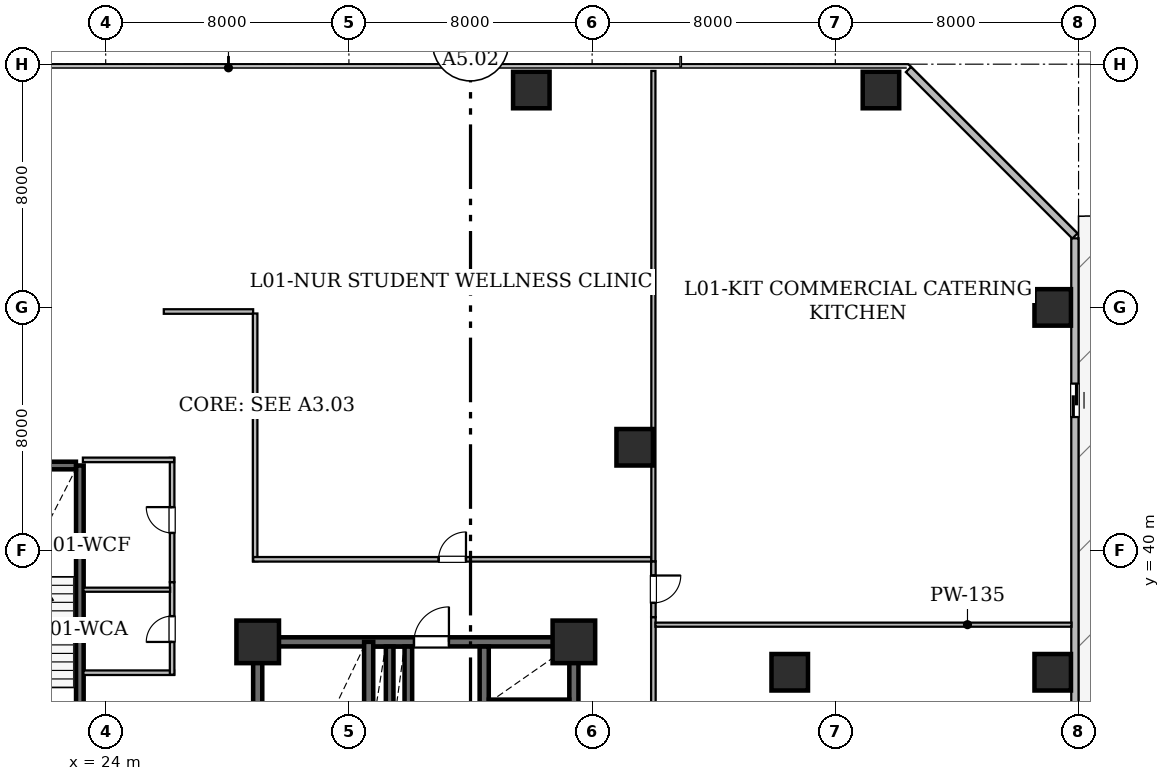
"""IFC4 building model, lengths in metres.
Left out: names, types, materials, properties, quantities, classifications, styles, units other than length and angle.
Written with IfcOpenShell. Run it as: python <this file> out.ifc"""

import sys

from ifc_helpers import new_model, si_unit, direction, frame, frame_2d, origin, origin_2d, place, context, subcontext, project, spatial, rectangle, hollow_rectangle, extrude, element, fill, save


model = new_model("IFC4")
c1 = context("Model", 3, precision=1e-05, world=origin(), true_north=direction((0.0, 1.0)))
c2 = subcontext(c1, "Body", "Model", "MODEL_VIEW")
j1 = project(units=[si_unit("LENGTHUNIT", "METRE"), si_unit("PLANEANGLEUNIT", "RADIAN")], contexts=[c1])
p1 = place(None, origin())
s1 = spatial("IfcSite", under=j1, at=p1, CompositionType="ELEMENT")
p2 = place(p1, origin())
s2 = spatial("IfcBuilding", under=s1, at=p2, CompositionType="ELEMENT")
p3 = place(p2, frame((0.0, 0.0, 7.2)))
s3 = spatial("IfcBuildingStorey", under=s2, at=p3, CompositionType="ELEMENT", Elevation=7.2)
for number, where, z_axis, x_axis in (
    (1, (29.0, 37.0, 0.0), (0.0, 0.0, 1.0), (1.0, 0.0, 0.0)),
    (2, (39.4, 37.0, 0.0), (0.0, 0.0, 1.0), (1.0, 0.0, 0.0)),
):
    element("IfcColumn", number, at=place(p3, frame(where, z_axis=z_axis, x_axis=x_axis)), inside=s3, PredefinedType="COLUMN", context=c2, shape_type="SweptSolid", body=[
        extrude(hollow_rectangle(XDim=1.4, YDim=1.4, WallThickness=0.07, at=origin_2d()), origin(), (0.0, 0.0, 1.0), 4.8),
    ])
for number, where, z_axis, x_axis in (
    (3, (38.0, 55.15, 0.0), (0.0, 0.0, 1.0), (1.0, 0.0, 0.0)),
    (4, (49.5, 55.15, 0.0), (0.0, 0.0, 1.0), (1.0, 0.0, 0.0)),
    (5, (55.15, 36.0, 0.0), (0.0, 0.0, 1.0), (1.0, 0.0, 0.0)),
    (6, (55.15, 48.0, 0.0), (0.0, 0.0, 1.0), (1.0, 0.0, 0.0)),
    (7, (41.4, 43.4, 0.0), (0.0, 0.0, 1.0), (1.0, 0.0, 0.0)),
    (8, (46.5, 36.0, 0.0), (0.0, 0.0, 1.0), (1.0, 0.0, 0.0)),
):
    element("IfcColumn", number, at=place(p3, frame(where, z_axis=z_axis, x_axis=x_axis)), inside=s3, PredefinedType="COLUMN", context=c2, shape_type="SweptSolid", body=[
        extrude(hollow_rectangle(XDim=1.2, YDim=1.2, WallThickness=0.06, at=origin_2d()), origin(), (0.0, 0.0, 1.0), 4.8),
    ])
p4 = place(p3, frame((50.405, 55.825, 0.0), z_axis=(0.0, 0.0, 1.0), x_axis=(0.707106781187, -0.707106781187, 0.0)))
e9 = element("IfcWall", 9, at=p4, inside=s3, PredefinedType="STANDARD", context=c2, shape_type="SweptSolid", body=[
    extrude(rectangle(XDim=7.743, YDim=0.24, at=frame_2d((3.871, 0.0))), origin(), (0.0, 0.0, 1.0), 4.48),
])
p5 = place(p3, frame((55.88, 50.272, 0.0), z_axis=(0.0, 0.0, 1.0), x_axis=(0.0, -1.0, 0.0)))
e10 = element("IfcWall", 10, at=p5, inside=s3, PredefinedType="STANDARD", context=c2, shape_type="SweptSolid", body=[
    extrude(rectangle(XDim=19.032, YDim=0.24, at=frame_2d((9.516, 0.0))), origin(), (0.0, 0.0, 1.0), 4.48),
])
p6 = place(p5, frame((4.778, 0.0, 0.0)))
e11 = element("IfcOpeningElement", 11, at=p6, cuts=e10, PredefinedType="OPENING", context=c2, shape_type="SweptSolid", body=[
    extrude(rectangle(XDim=1.1, YDim=2.2, at=frame_2d((0.55, 1.1))), frame((0.0, 0.13, 0.0), z_axis=(0.0, -1.0, 0.0), x_axis=(1.0, 0.0, 0.0)), (0.0, 0.0, 1.0), 0.26),
])
p7 = place(p3, frame((29.0, 28.0, 0.0), z_axis=(0.0, 0.0, 1.0), x_axis=(0.0, 1.0, 0.0)))
e12 = element("IfcWall", 12, at=p7, inside=s3, PredefinedType="SHEAR", context=c2, shape_type="SweptSolid", body=[
    extrude(rectangle(XDim=9.0, YDim=0.3, at=frame_2d((4.5, 0.0))), origin(), (0.0, 0.0, 1.0), 4.48),
])
p8 = place(p3, frame((29.0, 37.0, 0.0), z_axis=(0.0, 0.0, 1.0), x_axis=(1.0, 0.0, 0.0)))
e13 = element("IfcWall", 13, at=p8, inside=s3, PredefinedType="SHEAR", context=c2, shape_type="SweptSolid", body=[
    extrude(rectangle(XDim=10.4, YDim=0.3, at=frame_2d((5.2, 0.0))), origin(), (0.0, 0.0, 1.0), 4.48),
])
p9 = place(p8, frame((5.14, 0.0, 0.0)))
e14 = element("IfcOpeningElement", 14, at=p9, cuts=e13, PredefinedType="OPENING", context=c2, shape_type="SweptSolid", body=[
    extrude(rectangle(XDim=1.15, YDim=2.2, at=frame_2d((0.575, 1.1))), frame((0.0, 0.16, 0.0), z_axis=(0.0, -1.0, 0.0), x_axis=(1.0, 0.0, 0.0)), (0.0, 0.0, 1.0), 0.32),
])
p10 = place(p3, frame((39.4, 24.4, 0.0), z_axis=(0.0, 0.0, 1.0), x_axis=(0.0, 1.0, 0.0)))
e15 = element("IfcWall", 15, at=p10, inside=s3, PredefinedType="SHEAR", context=c2, shape_type="SweptSolid", body=[
    extrude(rectangle(XDim=12.6, YDim=0.3, at=frame_2d((6.3, 0.0))), origin(), (0.0, 0.0, 1.0), 4.48),
])
p11 = place(p3, frame((32.65, 28.0, 0.0), z_axis=(0.0, 0.0, 1.0), x_axis=(0.0, 1.0, 0.0)))
e16 = element("IfcWall", 16, at=p11, inside=s3, PredefinedType="SHEAR", context=c2, shape_type="SweptSolid", body=[
    extrude(rectangle(XDim=9.0, YDim=0.3, at=frame_2d((4.5, 0.0))), origin(), (0.0, 0.0, 1.0), 4.48),
])
p12 = place(p11, frame((0.72, 0.0, 0.0)))
e17 = element("IfcOpeningElement", 17, at=p12, cuts=e16, PredefinedType="OPENING", context=c2, shape_type="SweptSolid", body=[
    extrude(rectangle(XDim=1.0, YDim=2.15, at=frame_2d((0.5, 1.075))), frame((0.0, 0.16, 0.0), z_axis=(0.0, -1.0, 0.0), x_axis=(1.0, 0.0, 0.0)), (0.0, 0.0, 1.0), 0.32),
])
p13 = place(p3, frame((36.45, 31.45, 0.0), z_axis=(0.0, 0.0, 1.0), x_axis=(0.0, 1.0, 0.0)))
e18 = element("IfcWall", 18, at=p13, inside=s3, PredefinedType="SHEAR", context=c2, shape_type="SweptSolid", body=[
    extrude(rectangle(XDim=5.396, YDim=0.3, at=frame_2d((2.698, 0.0))), origin(), (0.0, 0.0, 1.0), 4.48),
])
p14 = place(p3, frame((36.604, 34.975, 0.0), z_axis=(0.0, 0.0, 1.0), x_axis=(1.0, 0.0, 0.0)))
e19 = element("IfcWall", 19, at=p14, inside=s3, PredefinedType="SHEAR", context=c2, shape_type="SweptSolid", body=[
    extrude(rectangle(XDim=2.642, YDim=0.25, at=frame_2d((1.321, 0.0))), origin(), (0.0, 0.0, 1.0), 4.48),
])
p15 = place(p3, frame((33.955, 34.025, 0.0), z_axis=(0.0, 0.0, 1.0), x_axis=(0.0, 1.0, 0.0)))
e20 = element("IfcWall", 20, at=p15, inside=s3, PredefinedType="SHEAR", context=c2, shape_type="SweptSolid", body=[
    extrude(rectangle(XDim=2.821, YDim=0.25, at=frame_2d((1.411, 0.0))), origin(), (0.0, 0.0, 1.0), 4.48),
])
p16 = place(p3, frame((33.34, 34.279, 0.0), z_axis=(0.0, 0.0, 1.0), x_axis=(0.0, 1.0, 0.0)))
e21 = element("IfcWall", 21, at=p16, inside=s3, PredefinedType="SHEAR", context=c2, shape_type="SweptSolid", body=[
    extrude(rectangle(XDim=2.567, YDim=0.25, at=frame_2d((1.283, 0.0))), origin(), (0.0, 0.0, 1.0), 4.48),
])
p17 = place(p3, frame((23.15, 33.6, 0.0), z_axis=(0.0, 0.0, 1.0), x_axis=(0.0, 1.0, 0.0)))
e22 = element("IfcWall", 22, at=p17, inside=s3, PredefinedType="SHEAR", context=c2, shape_type="SweptSolid", body=[
    extrude(rectangle(XDim=9.2, YDim=0.25, at=frame_2d((4.6, 0.0))), origin(), (0.0, 0.0, 1.0), 4.48),
])
p18 = place(p17, frame((0.4, 0.0, 0.0)))
e23 = element("IfcOpeningElement", 23, at=p18, cuts=e22, PredefinedType="OPENING", context=c2, shape_type="SweptSolid", body=[
    extrude(rectangle(XDim=1.0, YDim=2.15, at=frame_2d((0.5, 1.075))), frame((0.0, 0.135, 0.0), z_axis=(0.0, -1.0, 0.0), x_axis=(1.0, 0.0, 0.0)), (0.0, 0.0, 1.0), 0.27),
])
p19 = place(p3, frame((19.329, 42.8, 0.0), z_axis=(0.0, 0.0, 1.0), x_axis=(1.0, 0.0, 0.0)))
e24 = element("IfcWall", 24, at=p19, inside=s3, PredefinedType="SHEAR", context=c2, shape_type="SweptSolid", body=[
    extrude(rectangle(XDim=3.692, YDim=0.25, at=frame_2d((1.846, 0.0))), origin(), (0.0, 0.0, 1.0), 4.48),
])
p20 = place(p3, frame((23.267, 35.985, 0.0), z_axis=(0.0, 0.0, 1.0), x_axis=(1.0, 0.0, 0.0)))
e25 = element("IfcWall", 25, at=p20, inside=s3, PredefinedType="STANDARD", context=c2, shape_type="SweptSolid", body=[
    extrude(rectangle(XDim=2.983, YDim=0.15, at=frame_2d((1.491, 0.0))), origin(), (0.0, 0.0, 1.0), 4.48),
])
p21 = place(p3, frame((26.185, 35.922, 0.0), z_axis=(0.0, 0.0, 1.0), x_axis=(0.0, 1.0, 0.0)))
e26 = element("IfcWall", 26, at=p21, inside=s3, PredefinedType="STANDARD", context=c2, shape_type="SweptSolid", body=[
    extrude(rectangle(XDim=3.042, YDim=0.15, at=frame_2d((1.521, 0.0))), origin(), (0.0, 0.0, 1.0), 4.48),
])
p22 = place(p21, frame((1.075, 0.0, 0.0)))
e27 = element("IfcOpeningElement", 27, at=p22, cuts=e26, PredefinedType="OPENING", context=c2, shape_type="SweptSolid", body=[
    extrude(rectangle(XDim=0.85, YDim=2.1, at=frame_2d((0.425, 1.05))), frame((0.0, 0.085, 0.0), z_axis=(0.0, -1.0, 0.0), x_axis=(1.0, 0.0, 0.0)), (0.0, 0.0, 1.0), 0.17),
])
p23 = place(p3, frame((26.185, 38.964, 0.0), z_axis=(0.0, 0.0, 1.0), x_axis=(0.0, 1.0, 0.0)))
e28 = element("IfcWall", 28, at=p23, inside=s3, PredefinedType="STANDARD", context=c2, shape_type="SweptSolid", body=[
    extrude(rectangle(XDim=4.086, YDim=0.15, at=frame_2d((2.043, 0.0))), origin(), (0.0, 0.0, 1.0), 4.48),
])
p24 = place(p23, frame((1.618, 0.0, 0.0)))
e29 = element("IfcOpeningElement", 29, at=p24, cuts=e28, PredefinedType="OPENING", context=c2, shape_type="SweptSolid", body=[
    extrude(rectangle(XDim=0.85, YDim=2.1, at=frame_2d((0.425, 1.05))), frame((0.0, 0.085, 0.0), z_axis=(0.0, -1.0, 0.0), x_axis=(1.0, 0.0, 0.0)), (0.0, 0.0, 1.0), 0.17),
])
p25 = place(p3, frame((26.25, 42.985, 0.0), z_axis=(0.0, 0.0, 1.0), x_axis=(-1.0, 0.0, 0.0)))
e30 = element("IfcWall", 30, at=p25, inside=s3, PredefinedType="STANDARD", context=c2, shape_type="SweptSolid", body=[
    extrude(rectangle(XDim=3.0, YDim=0.15, at=frame_2d((1.5, 0.0))), origin(), (0.0, 0.0, 1.0), 4.48),
])
p26 = place(p3, frame((42.015, 37.814, 0.0), z_axis=(0.0, 0.0, 1.0), x_axis=(0.0, -1.0, 0.0)))
e31 = element("IfcWall", 31, at=p26, inside=s3, PredefinedType="STANDARD", context=c2, shape_type="SweptSolid", body=[
    extrude(rectangle(XDim=21.464, YDim=0.15, at=frame_2d((10.732, 0.0))), origin(), (0.0, 0.0, 1.0), 3.615),
])
p27 = place(p26, frame((10.178, 0.0, 0.0)))
e32 = element("IfcOpeningElement", 32, at=p27, cuts=e31, PredefinedType="OPENING", context=c2, shape_type="SweptSolid", body=[
    extrude(rectangle(XDim=1.15, YDim=2.2, at=frame_2d((0.575, 1.1))), frame((0.0, 0.085, 0.0), z_axis=(0.0, -1.0, 0.0), x_axis=(1.0, 0.0, 0.0)), (0.0, 0.0, 1.0), 0.17),
])
p28 = place(p3, frame((42.015, 39.65, 0.0), z_axis=(0.0, 0.0, 1.0), x_axis=(0.0, -1.0, 0.0)))
e33 = element("IfcWall", 33, at=p28, inside=s3, PredefinedType="STANDARD", context=c2, shape_type="SweptSolid", body=[
    extrude(rectangle(XDim=1.836, YDim=0.15, at=frame_2d((0.918, 0.0))), origin(), (0.0, 0.0, 1.0), 4.115),
])
p29 = place(p28, frame((0.468, 0.0, 0.0)))
e34 = element("IfcOpeningElement", 34, at=p29, cuts=e33, PredefinedType="OPENING", context=c2, shape_type="SweptSolid", body=[
    extrude(rectangle(XDim=0.9, YDim=2.1, at=frame_2d((0.45, 1.05))), frame((0.0, 0.085, 0.0), z_axis=(0.0, -1.0, 0.0), x_axis=(1.0, 0.0, 0.0)), (0.0, 0.0, 1.0), 0.17),
])
p30 = place(p3, frame((25.911, 47.865, 0.0), z_axis=(0.0, 0.0, 1.0), x_axis=(1.0, 0.0, 0.0)))
e35 = element("IfcWall", 35, at=p30, inside=s3, PredefinedType="STANDARD", context=c2, shape_type="SweptSolid", body=[
    extrude(rectangle(XDim=2.939, YDim=0.15, at=frame_2d((1.47, 0.0))), origin(), (0.0, 0.0, 1.0), 4.48),
])
p31 = place(p3, frame((28.915, 47.8, 0.0), z_axis=(0.0, 0.0, 1.0), x_axis=(0.0, -1.0, 0.0)))
e36 = element("IfcWall", 36, at=p31, inside=s3, PredefinedType="STANDARD", context=c2, shape_type="SweptSolid", body=[
    extrude(rectangle(XDim=8.15, YDim=0.15, at=frame_2d((4.075, 0.0))), origin(), (0.0, 0.0, 1.0), 3.615),
])
p32 = place(p3, frame((28.852, 39.715, 0.0), z_axis=(0.0, 0.0, 1.0), x_axis=(1.0, 0.0, 0.0)))
e37 = element("IfcWall", 37, at=p32, inside=s3, PredefinedType="STANDARD", context=c2, shape_type="SweptSolid", body=[
    extrude(rectangle(XDim=13.098, YDim=0.15, at=frame_2d((6.549, 0.0))), origin(), (0.0, 0.0, 1.0), 3.615),
])
p33 = place(p32, frame((6.099, 0.0, 0.0)))
e38 = element("IfcOpeningElement", 38, at=p33, cuts=e37, PredefinedType="OPENING", context=c2, shape_type="SweptSolid", body=[
    extrude(rectangle(XDim=0.9, YDim=2.1, at=frame_2d((0.45, 1.05))), frame((0.0, 0.085, 0.0), z_axis=(0.0, -1.0, 0.0), x_axis=(1.0, 0.0, 0.0)), (0.0, 0.0, 1.0), 0.17),
])
p34 = place(p3, frame((23.267, 38.715, 0.0), z_axis=(0.0, 0.0, 1.0), x_axis=(1.0, 0.0, 0.0)))
e39 = element("IfcWall", 39, at=p34, inside=s3, PredefinedType="PARTITIONING", context=c2, shape_type="SweptSolid", body=[
    extrude(rectangle(XDim=2.851, YDim=0.135, at=frame_2d((1.425, 0.0))), origin(), (0.0, 0.0, 1.0), 4.48),
])
p35 = place(p3, frame((42.082, 37.565, 0.0), z_axis=(0.0, 0.0, 1.0), x_axis=(1.0, 0.0, 0.0)))
e40 = element("IfcWall", 40, at=p35, inside=s3, PredefinedType="PARTITIONING", context=c2, shape_type="SweptSolid", body=[
    extrude(rectangle(XDim=13.686, YDim=0.135, at=frame_2d((6.843, 0.0))), origin(), (0.0, 0.0, 1.0), 3.615),
])
p36 = place(p3, frame((42.015, 39.65, 0.0), z_axis=(0.0, 0.0, 1.0), x_axis=(0.0, 1.0, 0.0)))
e41 = element("IfcWall", 41, at=p36, inside=s3, PredefinedType="PARTITIONING", context=c2, shape_type="SweptSolid", body=[
    extrude(rectangle(XDim=16.128, YDim=0.135, at=frame_2d((8.064, 0.0))), origin(), (0.0, 0.0, 1.0), 3.615),
])
p37 = place(p6, origin())
e42 = element("IfcDoor", 42, at=p37, inside=s3, OperationType="SLIDING_TO_LEFT", PredefinedType="DOOR", context=c2, shape_type="SweptSolid", body=[
    extrude(rectangle(XDim=1.1, YDim=2.2, at=frame_2d((0.55, 1.1))), frame((0.0, 0.025, 0.0), z_axis=(0.0, -1.0, 0.0), x_axis=(1.0, 0.0, 0.0)), (0.0, 0.0, 1.0), 0.05),
])
fill(e11, e42)
p38 = place(p9, origin())
e43 = element("IfcDoor", 43, at=p38, inside=s3, OperationType="SINGLE_SWING_RIGHT", PredefinedType="DOOR", context=c2, shape_type="SweptSolid", body=[
    extrude(rectangle(XDim=1.15, YDim=2.2, at=frame_2d((0.575, 1.1))), frame((0.0, 0.025, 0.0), z_axis=(0.0, -1.0, 0.0), x_axis=(1.0, 0.0, 0.0)), (0.0, 0.0, 1.0), 0.05),
])
fill(e14, e43)
p39 = place(p22, origin())
e44 = element("IfcDoor", 44, at=p39, inside=s3, OperationType="SINGLE_SWING_LEFT", PredefinedType="DOOR", context=c2, shape_type="SweptSolid", body=[
    extrude(rectangle(XDim=0.85, YDim=2.1, at=frame_2d((0.425, 1.05))), frame((0.0, 0.025, 0.0), z_axis=(0.0, -1.0, 0.0), x_axis=(1.0, 0.0, 0.0)), (0.0, 0.0, 1.0), 0.05),
])
fill(e27, e44)
p40 = place(p24, origin())
e45 = element("IfcDoor", 45, at=p40, inside=s3, OperationType="SINGLE_SWING_RIGHT", PredefinedType="DOOR", context=c2, shape_type="SweptSolid", body=[
    extrude(rectangle(XDim=0.85, YDim=2.1, at=frame_2d((0.425, 1.05))), frame((0.0, 0.025, 0.0), z_axis=(0.0, -1.0, 0.0), x_axis=(1.0, 0.0, 0.0)), (0.0, 0.0, 1.0), 0.05),
])
fill(e29, e45)
p41 = place(p29, origin())
e46 = element("IfcDoor", 46, at=p41, inside=s3, OperationType="SINGLE_SWING_LEFT", PredefinedType="DOOR", context=c2, shape_type="SweptSolid", body=[
    extrude(rectangle(XDim=0.9, YDim=2.1, at=frame_2d((0.45, 1.05))), frame((0.0, 0.025, 0.0), z_axis=(0.0, -1.0, 0.0), x_axis=(1.0, 0.0, 0.0)), (0.0, 0.0, 1.0), 0.05),
])
fill(e34, e46)
p42 = place(p33, origin())
e47 = element("IfcDoor", 47, at=p42, inside=s3, OperationType="SINGLE_SWING_RIGHT", PredefinedType="DOOR", context=c2, shape_type="SweptSolid", body=[
    extrude(rectangle(XDim=0.9, YDim=2.1, at=frame_2d((0.45, 1.05))), frame((0.0, 0.025, 0.0), z_axis=(0.0, -1.0, 0.0), x_axis=(1.0, 0.0, 0.0)), (0.0, 0.0, 1.0), 0.05),
])
fill(e38, e47)
save(model, sys.argv[1])
